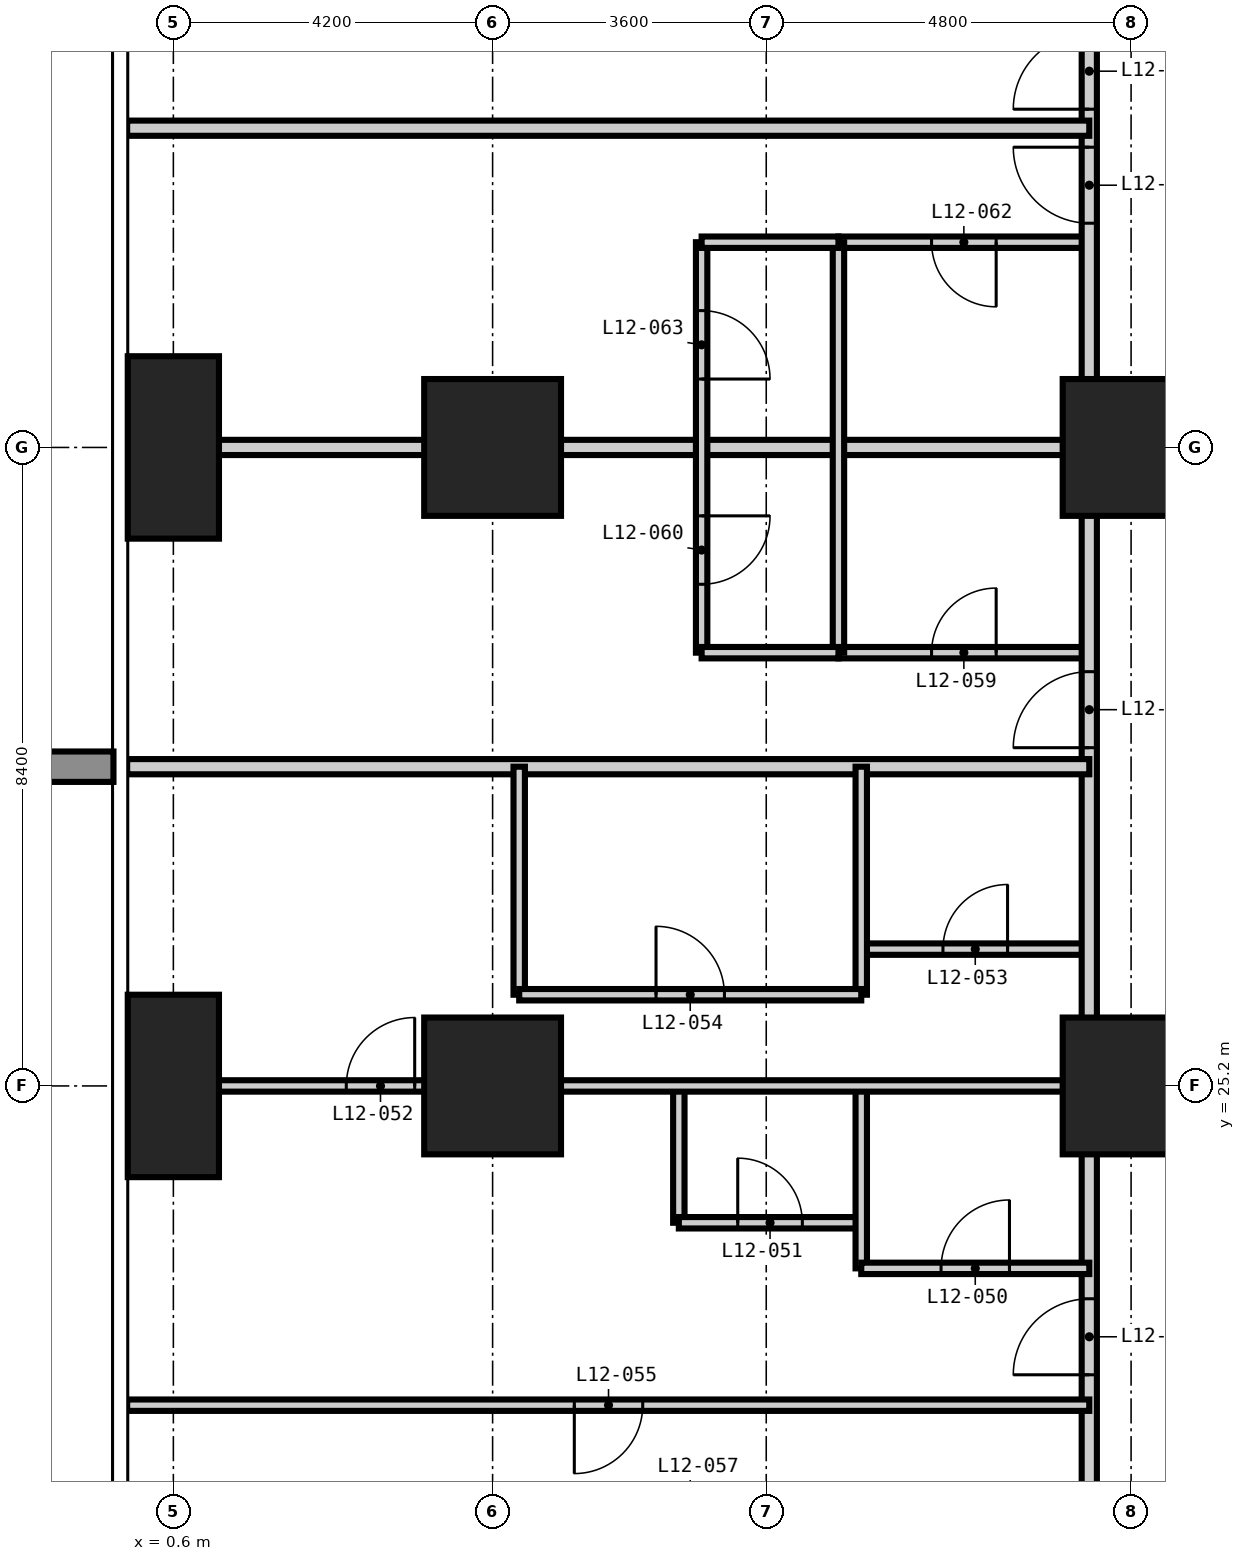
"""IFC4 building model, lengths in metres.
Left out: names, types, materials, properties, quantities, classifications, styles, units other than length and angle.
Written with IfcOpenShell. Run it as: python <this file> out.ifc"""

import sys

from ifc_helpers import new_model, si_unit, direction, frame, frame_2d, origin, origin_2d, place, context, subcontext, project, spatial, rectangle, extrude, element, fill, save


model = new_model("IFC4")
c1 = context("Model", 3, precision=1e-05, world=origin(), true_north=direction((0.0, 1.0)))
c2 = subcontext(c1, "Body", "Model", "MODEL_VIEW")
j1 = project(units=[si_unit("LENGTHUNIT", "METRE"), si_unit("PLANEANGLEUNIT", "RADIAN")], contexts=[c1])
p1 = place(None, origin())
s1 = spatial("IfcSite", under=j1, at=p1, CompositionType="ELEMENT")
p2 = place(p1, origin())
s2 = spatial("IfcBuilding", under=s1, at=p2, CompositionType="ELEMENT")
p3 = place(p2, frame((0.0, 0.0, 52.2)))
s3 = spatial("IfcBuildingStorey", under=s2, at=p3, CompositionType="ELEMENT", Elevation=52.2)
for number, where, z_axis, x_axis in (
    (1, (0.6, 25.2, -0.35), (0.0, 0.0, 1.0), (1.0, 0.0, 0.0)),
    (2, (0.6, 33.6, -0.35), (0.0, 0.0, 1.0), (1.0, 0.0, 0.0)),
):
    element("IfcColumn", number, at=place(p3, frame(where, z_axis=z_axis, x_axis=x_axis)), inside=s3, PredefinedType="COLUMN", context=c2, shape_type="SweptSolid", body=[
        extrude(rectangle(XDim=1.2, YDim=2.4, at=origin_2d()), origin(), (0.0, 0.0, 1.0), 3.6),
    ])
for number, where, z_axis, x_axis in (
    (3, (4.8, 25.2, -0.35), (0.0, 0.0, 1.0), (1.0, 0.0, 0.0)),
    (4, (4.8, 33.6, -0.35), (0.0, 0.0, 1.0), (1.0, 0.0, 0.0)),
    (5, (13.2, 25.2, -0.35), (0.0, 0.0, 1.0), (1.0, 0.0, 0.0)),
    (6, (13.2, 33.6, -0.35), (0.0, 0.0, 1.0), (1.0, 0.0, 0.0)),
):
    element("IfcColumn", number, at=place(p3, frame(where, z_axis=z_axis, x_axis=x_axis)), inside=s3, PredefinedType="COLUMN", context=c2, shape_type="SweptSolid", body=[
        extrude(rectangle(XDim=1.8, YDim=1.8, at=origin_2d()), origin(), (0.0, 0.0, 1.0), 3.6),
    ])
p4 = place(p3, frame((7.25, 23.4, 0.0), z_axis=(0.0, 0.0, 1.0), x_axis=(0.0, 1.0, 0.0)))
e7 = element("IfcWall", 7, at=p4, inside=s3, PredefinedType="PARTITIONING", context=c2, shape_type="SweptSolid", body=[
    extrude(rectangle(XDim=1.8, YDim=0.15, at=frame_2d((0.9, 0.0))), origin(), (0.0, 0.0, 1.0), 3.25),
])
p5 = place(p3, frame((7.25, 23.4, 0.0), z_axis=(0.0, 0.0, 1.0), x_axis=(1.0, 0.0, 0.0)))
e8 = element("IfcWall", 8, at=p5, inside=s3, PredefinedType="PARTITIONING", context=c2, shape_type="SweptSolid", body=[
    extrude(rectangle(XDim=2.4, YDim=0.15, at=frame_2d((1.2, 0.0))), origin(), (0.0, 0.0, 1.0), 3.25),
])
p6 = place(p5, frame((0.775, 0.0, 0.0)))
e9 = element("IfcOpeningElement", 9, at=p6, cuts=e8, PredefinedType="OPENING", context=c2, shape_type="SweptSolid", body=[
    extrude(rectangle(XDim=0.85, YDim=2.1, at=frame_2d((0.425, 1.05))), frame((0.0, 0.085, 0.0), z_axis=(0.0, -1.0, 0.0), x_axis=(1.0, 0.0, 0.0)), (0.0, 0.0, 1.0), 0.17),
])
p7 = place(p3, frame((9.65, 27.0, 0.0), z_axis=(0.0, 0.0, 1.0), x_axis=(1.0, 0.0, 0.0)))
e10 = element("IfcWall", 10, at=p7, inside=s3, PredefinedType="PARTITIONING", context=c2, shape_type="SweptSolid", body=[
    extrude(rectangle(XDim=3.0, YDim=0.15, at=frame_2d((1.5, 0.0))), origin(), (0.0, 0.0, 1.0), 3.25),
])
p8 = place(p7, frame((1.075, 0.0, 0.0)))
e11 = element("IfcOpeningElement", 11, at=p8, cuts=e10, PredefinedType="OPENING", context=c2, shape_type="SweptSolid", body=[
    extrude(rectangle(XDim=0.85, YDim=2.1, at=frame_2d((0.425, 1.05))), frame((0.0, 0.085, 0.0), z_axis=(0.0, -1.0, 0.0), x_axis=(1.0, 0.0, 0.0)), (0.0, 0.0, 1.0), 0.17),
])
p9 = place(p3, frame((9.35, 30.9, 0.0), z_axis=(0.0, 0.0, 1.0), x_axis=(1.0, 0.0, 0.0)))
e12 = element("IfcWall", 12, at=p9, inside=s3, PredefinedType="PARTITIONING", context=c2, shape_type="SweptSolid", body=[
    extrude(rectangle(XDim=3.3, YDim=0.15, at=frame_2d((1.65, 0.0))), origin(), (0.0, 0.0, 1.0), 3.25),
])
p10 = place(p9, frame((1.225, 0.0, 0.0)))
e13 = element("IfcOpeningElement", 13, at=p10, cuts=e12, PredefinedType="OPENING", context=c2, shape_type="SweptSolid", body=[
    extrude(rectangle(XDim=0.85, YDim=2.1, at=frame_2d((0.425, 1.05))), frame((0.0, 0.085, 0.0), z_axis=(0.0, -1.0, 0.0), x_axis=(1.0, 0.0, 0.0)), (0.0, 0.0, 1.0), 0.17),
])
p11 = place(p3, frame((9.35, 36.3, 0.0), z_axis=(0.0, 0.0, 1.0), x_axis=(1.0, 0.0, 0.0)))
e14 = element("IfcWall", 14, at=p11, inside=s3, PredefinedType="PARTITIONING", context=c2, shape_type="SweptSolid", body=[
    extrude(rectangle(XDim=3.3, YDim=0.15, at=frame_2d((1.65, 0.0))), origin(), (0.0, 0.0, 1.0), 3.25),
])
p12 = place(p11, frame((1.225, 0.0, 0.0)))
e15 = element("IfcOpeningElement", 15, at=p12, cuts=e14, PredefinedType="OPENING", context=c2, shape_type="SweptSolid", body=[
    extrude(rectangle(XDim=0.85, YDim=2.1, at=frame_2d((0.425, 1.05))), frame((0.0, 0.085, 0.0), z_axis=(0.0, -1.0, 0.0), x_axis=(1.0, 0.0, 0.0)), (0.0, 0.0, 1.0), 0.17),
])
p13 = place(p3, frame((12.65, 12.65, 0.0), z_axis=(0.0, 0.0, 1.0), x_axis=(0.0, 1.0, 0.0)))
e16 = element("IfcWall", 16, at=p13, inside=s3, PredefinedType="PARTITIONING", context=c2, shape_type="SweptSolid", body=[
    extrude(rectangle(XDim=32.9, YDim=0.2, at=frame_2d((16.45, 0.0))), origin(), (0.0, 0.0, 1.0), 3.25),
])
p14 = place(p13, frame((8.75, 0.0, 0.0)))
e17 = element("IfcOpeningElement", 17, at=p14, cuts=e16, PredefinedType="OPENING", context=c2, shape_type="SweptSolid", body=[
    extrude(rectangle(XDim=1.0, YDim=2.2, at=frame_2d((0.5, 1.1))), frame((0.0, 0.11, 0.0), z_axis=(0.0, -1.0, 0.0), x_axis=(1.0, 0.0, 0.0)), (0.0, 0.0, 1.0), 0.22),
])
p15 = place(p13, frame((17.0, 0.0, 0.0)))
e18 = element("IfcOpeningElement", 18, at=p15, cuts=e16, PredefinedType="OPENING", context=c2, shape_type="SweptSolid", body=[
    extrude(rectangle(XDim=1.0, YDim=2.2, at=frame_2d((0.5, 1.1))), frame((0.0, 0.11, 0.0), z_axis=(0.0, -1.0, 0.0), x_axis=(1.0, 0.0, 0.0)), (0.0, 0.0, 1.0), 0.22),
])
p16 = place(p13, frame((23.9, 0.0, 0.0)))
e19 = element("IfcOpeningElement", 19, at=p16, cuts=e16, PredefinedType="OPENING", context=c2, shape_type="SweptSolid", body=[
    extrude(rectangle(XDim=1.0, YDim=2.2, at=frame_2d((0.5, 1.1))), frame((0.0, 0.11, 0.0), z_axis=(0.0, -1.0, 0.0), x_axis=(1.0, 0.0, 0.0)), (0.0, 0.0, 1.0), 0.22),
])
p17 = place(p13, frame((25.4, 0.0, 0.0)))
e20 = element("IfcOpeningElement", 20, at=p17, cuts=e16, PredefinedType="OPENING", context=c2, shape_type="SweptSolid", body=[
    extrude(rectangle(XDim=1.0, YDim=2.2, at=frame_2d((0.5, 1.1))), frame((0.0, 0.11, 0.0), z_axis=(0.0, -1.0, 0.0), x_axis=(1.0, 0.0, 0.0)), (0.0, 0.0, 1.0), 0.22),
])
p18 = place(p13, frame((1.575, 0.0, 0.0)))
e21 = element("IfcOpeningElement", 21, at=p18, cuts=e16, PredefinedType="OPENING", context=c2, shape_type="SweptSolid", body=[
    extrude(rectangle(XDim=1.0, YDim=2.2, at=frame_2d((0.5, 1.1))), frame((0.0, 0.11, 0.0), z_axis=(0.0, -1.0, 0.0), x_axis=(1.0, 0.0, 0.0)), (0.0, 0.0, 1.0), 0.22),
])
p19 = place(p13, frame((30.625, 0.0, 0.0)))
e22 = element("IfcOpeningElement", 22, at=p19, cuts=e16, PredefinedType="OPENING", context=c2, shape_type="SweptSolid", body=[
    extrude(rectangle(XDim=1.0, YDim=2.2, at=frame_2d((0.5, 1.1))), frame((0.0, 0.11, 0.0), z_axis=(0.0, -1.0, 0.0), x_axis=(1.0, 0.0, 0.0)), (0.0, 0.0, 1.0), 0.22),
])
for number, where, z_axis, x_axis in (
    (23, (-0.008, 29.4, 0.0), (0.0, 0.0, 1.0), (1.0, 0.0, 0.0)),
    (24, (-0.008, 33.6, 0.0), (0.0, 0.0, 1.0), (1.0, 0.0, 0.0)),
    (25, (-0.008, 37.8, 0.0), (0.0, 0.0, 1.0), (1.0, 0.0, 0.0)),
):
    element("IfcWall", number, at=place(p3, frame(where, z_axis=z_axis, x_axis=x_axis)), inside=s3, PredefinedType="PARTITIONING", context=c2, shape_type="SweptSolid", body=[
        extrude(rectangle(XDim=12.658, YDim=0.2, at=frame_2d((6.329, 0.0))), origin(), (0.0, 0.0, 1.0), 3.25),
    ])
p20 = place(p3, frame((5.15, 26.4, 0.0), z_axis=(0.0, 0.0, 1.0), x_axis=(0.0, 1.0, 0.0)))
e26 = element("IfcWall", 26, at=p20, inside=s3, PredefinedType="PARTITIONING", context=c2, shape_type="SweptSolid", body=[
    extrude(rectangle(XDim=3.0, YDim=0.15, at=frame_2d((1.5, 0.0))), origin(), (0.0, 0.0, 1.0), 3.25),
])
p21 = place(p3, frame((7.55, 30.9, 0.0), z_axis=(0.0, 0.0, 1.0), x_axis=(0.0, 1.0, 0.0)))
e27 = element("IfcWall", 27, at=p21, inside=s3, PredefinedType="PARTITIONING", context=c2, shape_type="SweptSolid", body=[
    extrude(rectangle(XDim=5.4, YDim=0.15, at=frame_2d((2.7, 0.0))), origin(), (0.0, 0.0, 1.0), 3.25),
])
p22 = place(p21, frame((0.9, 0.0, 0.0)))
e28 = element("IfcOpeningElement", 28, at=p22, cuts=e27, PredefinedType="OPENING", context=c2, shape_type="SweptSolid", body=[
    extrude(rectangle(XDim=0.9, YDim=2.1, at=frame_2d((0.45, 1.05))), frame((0.0, 0.085, 0.0), z_axis=(0.0, -1.0, 0.0), x_axis=(1.0, 0.0, 0.0)), (0.0, 0.0, 1.0), 0.17),
])
p23 = place(p21, frame((3.6, 0.0, 0.0)))
e29 = element("IfcOpeningElement", 29, at=p23, cuts=e27, PredefinedType="OPENING", context=c2, shape_type="SweptSolid", body=[
    extrude(rectangle(XDim=0.9, YDim=2.1, at=frame_2d((0.45, 1.05))), frame((0.0, 0.085, 0.0), z_axis=(0.0, -1.0, 0.0), x_axis=(1.0, 0.0, 0.0)), (0.0, 0.0, 1.0), 0.17),
])
p24 = place(p3, frame((9.35, 30.9, 0.0), z_axis=(0.0, 0.0, 1.0), x_axis=(0.0, 1.0, 0.0)))
e30 = element("IfcWall", 30, at=p24, inside=s3, PredefinedType="PARTITIONING", context=c2, shape_type="SweptSolid", body=[
    extrude(rectangle(XDim=5.4, YDim=0.15, at=frame_2d((2.7, 0.0))), origin(), (0.0, 0.0, 1.0), 3.25),
])
p25 = place(p3, frame((9.65, 22.8, 0.0), z_axis=(0.0, 0.0, 1.0), x_axis=(0.0, 1.0, 0.0)))
e31 = element("IfcWall", 31, at=p25, inside=s3, PredefinedType="PARTITIONING", context=c2, shape_type="SweptSolid", body=[
    extrude(rectangle(XDim=2.4, YDim=0.15, at=frame_2d((1.2, 0.0))), origin(), (0.0, 0.0, 1.0), 3.25),
])
p26 = place(p3, frame((9.65, 26.4, 0.0), z_axis=(0.0, 0.0, 1.0), x_axis=(0.0, 1.0, 0.0)))
e32 = element("IfcWall", 32, at=p26, inside=s3, PredefinedType="PARTITIONING", context=c2, shape_type="SweptSolid", body=[
    extrude(rectangle(XDim=3.0, YDim=0.15, at=frame_2d((1.5, 0.0))), origin(), (0.0, 0.0, 1.0), 3.25),
])
p27 = place(p3, frame((-0.008, 21.0, 0.0), z_axis=(0.0, 0.0, 1.0), x_axis=(1.0, 0.0, 0.0)))
e33 = element("IfcWall", 33, at=p27, inside=s3, PredefinedType="PARTITIONING", context=c2, shape_type="SweptSolid", body=[
    extrude(rectangle(XDim=12.658, YDim=0.15, at=frame_2d((6.329, 0.0))), origin(), (0.0, 0.0, 1.0), 3.25),
])
p28 = place(p27, frame((5.883, 0.0, 0.0)))
e34 = element("IfcOpeningElement", 34, at=p28, cuts=e33, PredefinedType="OPENING", context=c2, shape_type="SweptSolid", body=[
    extrude(rectangle(XDim=0.9, YDim=2.1, at=frame_2d((0.45, 1.05))), frame((0.0, 0.085, 0.0), z_axis=(0.0, -1.0, 0.0), x_axis=(1.0, 0.0, 0.0)), (0.0, 0.0, 1.0), 0.17),
])
p29 = place(p3, frame((9.65, 22.8, 0.0), z_axis=(0.0, 0.0, 1.0), x_axis=(1.0, 0.0, 0.0)))
e35 = element("IfcWall", 35, at=p29, inside=s3, PredefinedType="PARTITIONING", context=c2, shape_type="SweptSolid", body=[
    extrude(rectangle(XDim=3.0, YDim=0.15, at=frame_2d((1.5, 0.0))), origin(), (0.0, 0.0, 1.0), 3.25),
])
p30 = place(p29, frame((1.05, 0.0, 0.0)))
e36 = element("IfcOpeningElement", 36, at=p30, cuts=e35, PredefinedType="OPENING", context=c2, shape_type="SweptSolid", body=[
    extrude(rectangle(XDim=0.9, YDim=2.1, at=frame_2d((0.45, 1.05))), frame((0.0, 0.085, 0.0), z_axis=(0.0, -1.0, 0.0), x_axis=(1.0, 0.0, 0.0)), (0.0, 0.0, 1.0), 0.17),
])
p31 = place(p3, frame((-0.008, 25.2, 0.0), z_axis=(0.0, 0.0, 1.0), x_axis=(1.0, 0.0, 0.0)))
e37 = element("IfcWall", 37, at=p31, inside=s3, PredefinedType="PARTITIONING", context=c2, shape_type="SweptSolid", body=[
    extrude(rectangle(XDim=12.658, YDim=0.15, at=frame_2d((6.329, 0.0))), origin(), (0.0, 0.0, 1.0), 3.25),
])
p32 = place(p31, frame((2.883, 0.0, 0.0)))
e38 = element("IfcOpeningElement", 38, at=p32, cuts=e37, PredefinedType="OPENING", context=c2, shape_type="SweptSolid", body=[
    extrude(rectangle(XDim=0.9, YDim=2.1, at=frame_2d((0.45, 1.05))), frame((0.0, 0.085, 0.0), z_axis=(0.0, -1.0, 0.0), x_axis=(1.0, 0.0, 0.0)), (0.0, 0.0, 1.0), 0.17),
])
p33 = place(p3, frame((5.15, 26.4, 0.0), z_axis=(0.0, 0.0, 1.0), x_axis=(1.0, 0.0, 0.0)))
e39 = element("IfcWall", 39, at=p33, inside=s3, PredefinedType="PARTITIONING", context=c2, shape_type="SweptSolid", body=[
    extrude(rectangle(XDim=4.5, YDim=0.15, at=frame_2d((2.25, 0.0))), origin(), (0.0, 0.0, 1.0), 3.25),
])
p34 = place(p33, frame((1.8, 0.0, 0.0)))
e40 = element("IfcOpeningElement", 40, at=p34, cuts=e39, PredefinedType="OPENING", context=c2, shape_type="SweptSolid", body=[
    extrude(rectangle(XDim=0.9, YDim=2.1, at=frame_2d((0.45, 1.05))), frame((0.0, 0.085, 0.0), z_axis=(0.0, -1.0, 0.0), x_axis=(1.0, 0.0, 0.0)), (0.0, 0.0, 1.0), 0.17),
])
for number, where, z_axis, x_axis in (
    (41, (7.55, 30.9, 0.0), (0.0, 0.0, 1.0), (1.0, 0.0, 0.0)),
    (42, (7.55, 36.3, 0.0), (0.0, 0.0, 1.0), (1.0, 0.0, 0.0)),
):
    element("IfcWall", number, at=place(p3, frame(where, z_axis=z_axis, x_axis=x_axis)), inside=s3, PredefinedType="PARTITIONING", context=c2, shape_type="SweptSolid", body=[
        extrude(rectangle(XDim=1.8, YDim=0.15, at=frame_2d((0.9, 0.0))), origin(), (0.0, 0.0, 1.0), 3.25),
    ])
p35 = place(p14, origin())
e43 = element("IfcDoor", 43, at=p35, inside=s3, OperationType="SINGLE_SWING_LEFT", PredefinedType="DOOR", context=c2, shape_type="SweptSolid", body=[
    extrude(rectangle(XDim=1.0, YDim=2.2, at=frame_2d((0.5, 1.1))), frame((0.0, 0.025, 0.0), z_axis=(0.0, -1.0, 0.0), x_axis=(1.0, 0.0, 0.0)), (0.0, 0.0, 1.0), 0.05),
])
fill(e17, e43)
p36 = place(p30, origin())
e44 = element("IfcDoor", 44, at=p36, inside=s3, OperationType="SINGLE_SWING_RIGHT", PredefinedType="DOOR", context=c2, shape_type="SweptSolid", body=[
    extrude(rectangle(XDim=0.9, YDim=2.1, at=frame_2d((0.45, 1.05))), frame((0.0, 0.025, 0.0), z_axis=(0.0, -1.0, 0.0), x_axis=(1.0, 0.0, 0.0)), (0.0, 0.0, 1.0), 0.05),
])
fill(e36, e44)
p37 = place(p6, origin())
e45 = element("IfcDoor", 45, at=p37, inside=s3, OperationType="SINGLE_SWING_LEFT", PredefinedType="DOOR", context=c2, shape_type="SweptSolid", body=[
    extrude(rectangle(XDim=0.85, YDim=2.1, at=frame_2d((0.425, 1.05))), frame((0.0, 0.025, 0.0), z_axis=(0.0, -1.0, 0.0), x_axis=(1.0, 0.0, 0.0)), (0.0, 0.0, 1.0), 0.05),
])
fill(e9, e45)
p38 = place(p32, origin())
e46 = element("IfcDoor", 46, at=p38, inside=s3, OperationType="SINGLE_SWING_RIGHT", PredefinedType="DOOR", context=c2, shape_type="SweptSolid", body=[
    extrude(rectangle(XDim=0.9, YDim=2.1, at=frame_2d((0.45, 1.05))), frame((0.0, 0.025, 0.0), z_axis=(0.0, -1.0, 0.0), x_axis=(1.0, 0.0, 0.0)), (0.0, 0.0, 1.0), 0.05),
])
fill(e38, e46)
p39 = place(p8, origin())
e47 = element("IfcDoor", 47, at=p39, inside=s3, OperationType="SINGLE_SWING_RIGHT", PredefinedType="DOOR", context=c2, shape_type="SweptSolid", body=[
    extrude(rectangle(XDim=0.85, YDim=2.1, at=frame_2d((0.425, 1.05))), frame((0.0, 0.025, 0.0), z_axis=(0.0, -1.0, 0.0), x_axis=(1.0, 0.0, 0.0)), (0.0, 0.0, 1.0), 0.05),
])
fill(e11, e47)
p40 = place(p34, origin())
e48 = element("IfcDoor", 48, at=p40, inside=s3, OperationType="SINGLE_SWING_LEFT", PredefinedType="DOOR", context=c2, shape_type="SweptSolid", body=[
    extrude(rectangle(XDim=0.9, YDim=2.1, at=frame_2d((0.45, 1.05))), frame((0.0, 0.025, 0.0), z_axis=(0.0, -1.0, 0.0), x_axis=(1.0, 0.0, 0.0)), (0.0, 0.0, 1.0), 0.05),
])
fill(e40, e48)
p41 = place(p28, frame((0.9, 0.0, 0.0), z_axis=(0.0, 0.0, 1.0), x_axis=(-1.0, 0.0, 0.0)))
e49 = element("IfcDoor", 49, at=p41, inside=s3, OperationType="SINGLE_SWING_RIGHT", PredefinedType="DOOR", context=c2, shape_type="SweptSolid", body=[
    extrude(rectangle(XDim=0.9, YDim=2.1, at=frame_2d((0.45, 1.05))), frame((0.0, 0.025, 0.0), z_axis=(0.0, -1.0, 0.0), x_axis=(1.0, 0.0, 0.0)), (0.0, 0.0, 1.0), 0.05),
])
fill(e34, e49)
p42 = place(p15, origin())
e50 = element("IfcDoor", 50, at=p42, inside=s3, OperationType="SINGLE_SWING_LEFT", PredefinedType="DOOR", context=c2, shape_type="SweptSolid", body=[
    extrude(rectangle(XDim=1.0, YDim=2.2, at=frame_2d((0.5, 1.1))), frame((0.0, 0.025, 0.0), z_axis=(0.0, -1.0, 0.0), x_axis=(1.0, 0.0, 0.0)), (0.0, 0.0, 1.0), 0.05),
])
fill(e18, e50)
p43 = place(p10, origin())
e51 = element("IfcDoor", 51, at=p43, inside=s3, OperationType="SINGLE_SWING_RIGHT", PredefinedType="DOOR", context=c2, shape_type="SweptSolid", body=[
    extrude(rectangle(XDim=0.85, YDim=2.1, at=frame_2d((0.425, 1.05))), frame((0.0, 0.025, 0.0), z_axis=(0.0, -1.0, 0.0), x_axis=(1.0, 0.0, 0.0)), (0.0, 0.0, 1.0), 0.05),
])
fill(e13, e51)
p44 = place(p22, frame((0.9, 0.0, 0.0), z_axis=(0.0, 0.0, 1.0), x_axis=(-1.0, 0.0, 0.0)))
e52 = element("IfcDoor", 52, at=p44, inside=s3, OperationType="SINGLE_SWING_LEFT", PredefinedType="DOOR", context=c2, shape_type="SweptSolid", body=[
    extrude(rectangle(XDim=0.9, YDim=2.1, at=frame_2d((0.45, 1.05))), frame((0.0, 0.025, 0.0), z_axis=(0.0, -1.0, 0.0), x_axis=(1.0, 0.0, 0.0)), (0.0, 0.0, 1.0), 0.05),
])
fill(e28, e52)
p45 = place(p16, origin())
e53 = element("IfcDoor", 53, at=p45, inside=s3, OperationType="SINGLE_SWING_RIGHT", PredefinedType="DOOR", context=c2, shape_type="SweptSolid", body=[
    extrude(rectangle(XDim=1.0, YDim=2.2, at=frame_2d((0.5, 1.1))), frame((0.0, 0.025, 0.0), z_axis=(0.0, -1.0, 0.0), x_axis=(1.0, 0.0, 0.0)), (0.0, 0.0, 1.0), 0.05),
])
fill(e19, e53)
p46 = place(p12, frame((0.85, 0.0, 0.0), z_axis=(0.0, 0.0, 1.0), x_axis=(-1.0, 0.0, 0.0)))
e54 = element("IfcDoor", 54, at=p46, inside=s3, OperationType="SINGLE_SWING_LEFT", PredefinedType="DOOR", context=c2, shape_type="SweptSolid", body=[
    extrude(rectangle(XDim=0.85, YDim=2.1, at=frame_2d((0.425, 1.05))), frame((0.0, 0.025, 0.0), z_axis=(0.0, -1.0, 0.0), x_axis=(1.0, 0.0, 0.0)), (0.0, 0.0, 1.0), 0.05),
])
fill(e15, e54)
p47 = place(p23, frame((0.9, 0.0, 0.0), z_axis=(0.0, 0.0, 1.0), x_axis=(-1.0, 0.0, 0.0)))
e55 = element("IfcDoor", 55, at=p47, inside=s3, OperationType="SINGLE_SWING_RIGHT", PredefinedType="DOOR", context=c2, shape_type="SweptSolid", body=[
    extrude(rectangle(XDim=0.9, YDim=2.1, at=frame_2d((0.45, 1.05))), frame((0.0, 0.025, 0.0), z_axis=(0.0, -1.0, 0.0), x_axis=(1.0, 0.0, 0.0)), (0.0, 0.0, 1.0), 0.05),
])
fill(e29, e55)
p48 = place(p17, origin())
e56 = element("IfcDoor", 56, at=p48, inside=s3, OperationType="SINGLE_SWING_LEFT", PredefinedType="DOOR", context=c2, shape_type="SweptSolid", body=[
    extrude(rectangle(XDim=1.0, YDim=2.2, at=frame_2d((0.5, 1.1))), frame((0.0, 0.025, 0.0), z_axis=(0.0, -1.0, 0.0), x_axis=(1.0, 0.0, 0.0)), (0.0, 0.0, 1.0), 0.05),
])
fill(e20, e56)
save(model, sys.argv[1])
